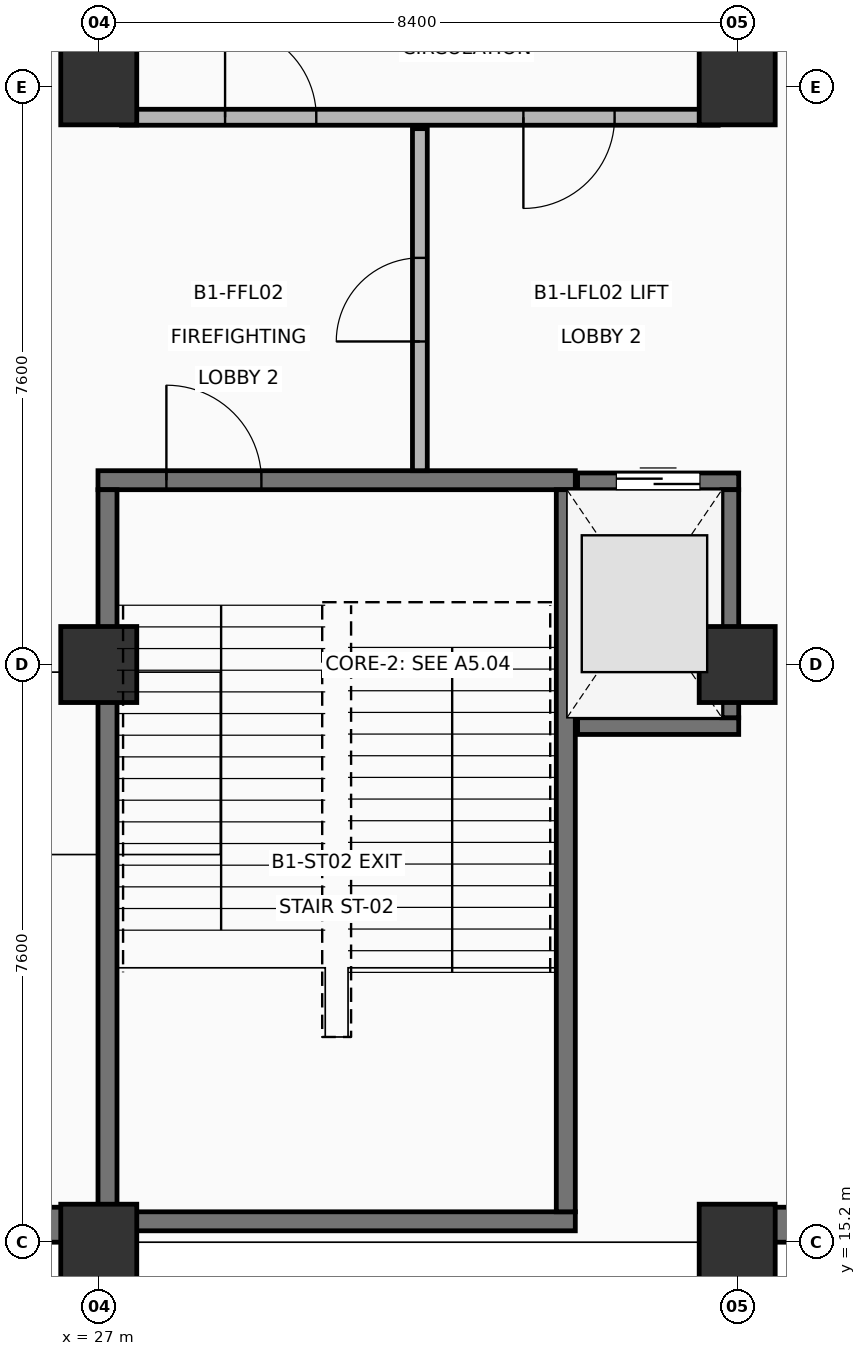
"""IFC4 building model, lengths in metres.
Left out: names, types, materials, properties, quantities, classifications, styles, units other than length and angle.
Written with IfcOpenShell. Run it as: python <this file> out.ifc"""

import sys

from ifc_helpers import new_model, si_unit, direction, frame, frame_2d, origin, origin_2d, place, context, subcontext, project, spatial, rectangle, extrude, element, fill, save


model = new_model("IFC4")
c1 = context("Model", 3, precision=1e-05, world=origin(), true_north=direction((0.0, 1.0)))
c2 = subcontext(c1, "Body", "Model", "MODEL_VIEW")
j1 = project(units=[si_unit("LENGTHUNIT", "METRE"), si_unit("PLANEANGLEUNIT", "RADIAN")], contexts=[c1])
p1 = place(None, origin())
s1 = spatial("IfcSite", under=j1, at=p1, CompositionType="ELEMENT")
p2 = place(p1, origin())
s2 = spatial("IfcBuilding", under=s1, at=p2, CompositionType="ELEMENT")
p3 = place(p2, frame((0.0, 0.0, -5.4)))
s3 = spatial("IfcBuildingStorey", under=s2, at=p3, CompositionType="ELEMENT", Elevation=-5.4)
for number, where, z_axis, x_axis in (
    (1, (27.0, 15.2, 0.0), (0.0, 0.0, 1.0), (1.0, 0.0, 0.0)),
    (2, (27.0, 22.8, 0.0), (0.0, 0.0, 1.0), (1.0, 0.0, 0.0)),
    (3, (27.0, 30.4, 0.0), (0.0, 0.0, 1.0), (1.0, 0.0, 0.0)),
    (4, (35.4, 15.2, 0.0), (0.0, 0.0, 1.0), (1.0, 0.0, 0.0)),
    (5, (35.4, 22.8, 0.0), (0.0, 0.0, 1.0), (1.0, 0.0, 0.0)),
    (6, (35.4, 30.4, 0.0), (0.0, 0.0, 1.0), (1.0, 0.0, 0.0)),
):
    element("IfcColumn", number, at=place(p3, frame(where, z_axis=z_axis, x_axis=x_axis)), inside=s3, PredefinedType="COLUMN", context=c2, shape_type="SweptSolid", body=[
        extrude(rectangle(XDim=1.0, YDim=1.0, at=origin_2d()), origin(), (0.0, 0.0, 1.0), 5.4),
    ])
for number, where, z_axis, x_axis in (
    (7, (43.315, 15.43, 0.0), (0.0, 0.0, 1.0), (-1.0, 0.0, 0.0)),
    (8, (26.515, 15.43, 0.0), (0.0, 0.0, 1.0), (-1.0, 0.0, 0.0)),
):
    element("IfcWall", number, at=place(p3, frame(where, z_axis=z_axis, x_axis=x_axis)), inside=s3, PredefinedType="USERDEFINED", context=c2, shape_type="SweptSolid", body=[
        extrude(rectangle(XDim=7.43, YDim=0.46, at=frame_2d((3.715, 0.0))), origin(), (0.0, 0.0, 1.0), 5.12),
    ])
p4 = place(p3, frame((26.99, 15.475, 0.0), z_axis=(0.0, 0.0, 1.0), x_axis=(1.0, 0.0, 0.0)))
e9 = element("IfcWall", 9, at=p4, inside=s3, PredefinedType="SHEAR", context=c2, shape_type="SweptSolid", body=[
    extrude(rectangle(XDim=6.28, YDim=0.25, at=frame_2d((3.14, 0.0))), origin(), (0.0, 0.0, 1.0), 5.12),
])
p5 = place(p3, frame((26.99, 25.225, 0.0), z_axis=(0.0, 0.0, 1.0), x_axis=(1.0, 0.0, 0.0)))
e10 = element("IfcWall", 10, at=p5, inside=s3, PredefinedType="SHEAR", context=c2, shape_type="SweptSolid", body=[
    extrude(rectangle(XDim=6.28, YDim=0.25, at=frame_2d((3.14, 0.0))), origin(), (0.0, 0.0, 1.0), 5.12),
])
p6 = place(p5, frame((0.9, 0.0, 0.0)))
e11 = element("IfcOpeningElement", 11, at=p6, cuts=e10, PredefinedType="OPENING", context=c2, shape_type="SweptSolid", body=[
    extrude(rectangle(XDim=1.25, YDim=2.2, at=frame_2d((0.625, 1.1))), frame((0.0, 0.135, 0.0), z_axis=(0.0, -1.0, 0.0), x_axis=(1.0, 0.0, 0.0)), (0.0, 0.0, 1.0), 0.27),
])
for number, where, z_axis, x_axis in (
    (12, (27.115, 15.6, 0.0), (0.0, 0.0, 1.0), (0.0, 1.0, 0.0)),
    (13, (33.145, 15.6, 0.0), (0.0, 0.0, 1.0), (0.0, 1.0, 0.0)),
):
    element("IfcWall", number, at=place(p3, frame(where, z_axis=z_axis, x_axis=x_axis)), inside=s3, PredefinedType="SHEAR", context=c2, shape_type="SweptSolid", body=[
        extrude(rectangle(XDim=9.5, YDim=0.25, at=frame_2d((4.75, 0.0))), origin(), (0.0, 0.0, 1.0), 5.12),
    ])
p7 = place(p3, frame((33.3, 21.99, 0.0), z_axis=(0.0, 0.0, 1.0), x_axis=(1.0, 0.0, 0.0)))
e14 = element("IfcWall", 14, at=p7, inside=s3, PredefinedType="SHEAR", context=c2, shape_type="SweptSolid", body=[
    extrude(rectangle(XDim=2.12, YDim=0.22, at=frame_2d((1.06, 0.0))), origin(), (0.0, 0.0, 1.0), 5.12),
])
p8 = place(p3, frame((33.3, 25.21, 0.0), z_axis=(0.0, 0.0, 1.0), x_axis=(1.0, 0.0, 0.0)))
e15 = element("IfcWall", 15, at=p8, inside=s3, PredefinedType="SHEAR", context=c2, shape_type="SweptSolid", body=[
    extrude(rectangle(XDim=2.12, YDim=0.22, at=frame_2d((1.06, 0.0))), origin(), (0.0, 0.0, 1.0), 5.12),
])
p9 = place(p8, frame((0.51, 0.0, 0.0)))
e16 = element("IfcOpeningElement", 16, at=p9, cuts=e15, PredefinedType="OPENING", context=c2, shape_type="SweptSolid", body=[
    extrude(rectangle(XDim=1.1, YDim=2.15, at=frame_2d((0.55, 1.075))), frame((0.0, 0.12, 0.0), z_axis=(0.0, -1.0, 0.0), x_axis=(1.0, 0.0, 0.0)), (0.0, 0.0, 1.0), 0.24),
])
p10 = place(p3, frame((35.31, 22.1, 0.0), z_axis=(0.0, 0.0, 1.0), x_axis=(0.0, 1.0, 0.0)))
e17 = element("IfcWall", 17, at=p10, inside=s3, PredefinedType="SHEAR", context=c2, shape_type="SweptSolid", body=[
    extrude(rectangle(XDim=3.0, YDim=0.22, at=frame_2d((1.5, 0.0))), origin(), (0.0, 0.0, 1.0), 5.12),
])
p11 = place(p3, frame((27.3, 30.0, 0.0), z_axis=(0.0, 0.0, 1.0), x_axis=(1.0, 0.0, 0.0)))
e18 = element("IfcWall", 18, at=p11, inside=s3, PredefinedType="PARTITIONING", context=c2, shape_type="SweptSolid", body=[
    extrude(rectangle(XDim=7.85, YDim=0.21, at=frame_2d((3.925, 0.0))), origin(), (0.0, 0.0, 1.0), 5.12),
])
p12 = place(p11, frame((1.362, 0.0, 0.0)))
e19 = element("IfcOpeningElement", 19, at=p12, cuts=e18, PredefinedType="OPENING", context=c2, shape_type="SweptSolid", body=[
    extrude(rectangle(XDim=1.2, YDim=2.2, at=frame_2d((0.6, 1.1))), frame((0.0, 0.115, 0.0), z_axis=(0.0, -1.0, 0.0), x_axis=(1.0, 0.0, 0.0)), (0.0, 0.0, 1.0), 0.23),
])
p13 = place(p11, frame((5.287, 0.0, 0.0)))
e20 = element("IfcOpeningElement", 20, at=p13, cuts=e18, PredefinedType="OPENING", context=c2, shape_type="SweptSolid", body=[
    extrude(rectangle(XDim=1.2, YDim=2.2, at=frame_2d((0.6, 1.1))), frame((0.0, 0.115, 0.0), z_axis=(0.0, -1.0, 0.0), x_axis=(1.0, 0.0, 0.0)), (0.0, 0.0, 1.0), 0.23),
])
p14 = place(p3, frame((31.225, 25.35, 0.0), z_axis=(0.0, 0.0, 1.0), x_axis=(0.0, 1.0, 0.0)))
e21 = element("IfcWall", 21, at=p14, inside=s3, PredefinedType="PARTITIONING", context=c2, shape_type="SweptSolid", body=[
    extrude(rectangle(XDim=4.5, YDim=0.195, at=frame_2d((2.25, 0.0))), origin(), (0.0, 0.0, 1.0), 5.12),
])
p15 = place(p14, frame((1.7, 0.0, 0.0)))
e22 = element("IfcOpeningElement", 22, at=p15, cuts=e21, PredefinedType="OPENING", context=c2, shape_type="SweptSolid", body=[
    extrude(rectangle(XDim=1.1, YDim=2.15, at=frame_2d((0.55, 1.075))), frame((0.0, 0.107, 0.0), z_axis=(0.0, -1.0, 0.0), x_axis=(1.0, 0.0, 0.0)), (0.0, 0.0, 1.0), 0.215),
])
p16 = place(p6, origin())
e23 = element("IfcDoor", 23, at=p16, inside=s3, OperationType="SINGLE_SWING_LEFT", PredefinedType="DOOR", context=c2, shape_type="SweptSolid", body=[
    extrude(rectangle(XDim=1.25, YDim=2.2, at=frame_2d((0.625, 1.1))), frame((0.0, 0.025, 0.0), z_axis=(0.0, -1.0, 0.0), x_axis=(1.0, 0.0, 0.0)), (0.0, 0.0, 1.0), 0.05),
])
fill(e11, e23)
p17 = place(p9, origin())
e24 = element("IfcDoor", 24, at=p17, inside=s3, OperationType="DOUBLE_DOOR_SLIDING", PredefinedType="DOOR", context=c2, shape_type="SweptSolid", body=[
    extrude(rectangle(XDim=1.1, YDim=2.15, at=frame_2d((0.55, 1.075))), frame((0.0, 0.025, 0.0), z_axis=(0.0, -1.0, 0.0), x_axis=(1.0, 0.0, 0.0)), (0.0, 0.0, 1.0), 0.05),
])
fill(e16, e24)
p18 = place(p12, origin())
e25 = element("IfcDoor", 25, at=p18, inside=s3, OperationType="SINGLE_SWING_LEFT", PredefinedType="DOOR", context=c2, shape_type="SweptSolid", body=[
    extrude(rectangle(XDim=1.2, YDim=2.2, at=frame_2d((0.6, 1.1))), frame((0.0, 0.025, 0.0), z_axis=(0.0, -1.0, 0.0), x_axis=(1.0, 0.0, 0.0)), (0.0, 0.0, 1.0), 0.05),
])
fill(e19, e25)
p19 = place(p13, origin())
e26 = element("IfcDoor", 26, at=p19, inside=s3, OperationType="SINGLE_SWING_RIGHT", PredefinedType="DOOR", context=c2, shape_type="SweptSolid", body=[
    extrude(rectangle(XDim=1.2, YDim=2.2, at=frame_2d((0.6, 1.1))), frame((0.0, 0.025, 0.0), z_axis=(0.0, -1.0, 0.0), x_axis=(1.0, 0.0, 0.0)), (0.0, 0.0, 1.0), 0.05),
])
fill(e20, e26)
p20 = place(p15, origin())
e27 = element("IfcDoor", 27, at=p20, inside=s3, OperationType="SINGLE_SWING_LEFT", PredefinedType="DOOR", context=c2, shape_type="SweptSolid", body=[
    extrude(rectangle(XDim=1.1, YDim=2.15, at=frame_2d((0.55, 1.075))), frame((0.0, 0.025, 0.0), z_axis=(0.0, -1.0, 0.0), x_axis=(1.0, 0.0, 0.0)), (0.0, 0.0, 1.0), 0.05),
])
fill(e22, e27)
save(model, sys.argv[1])
